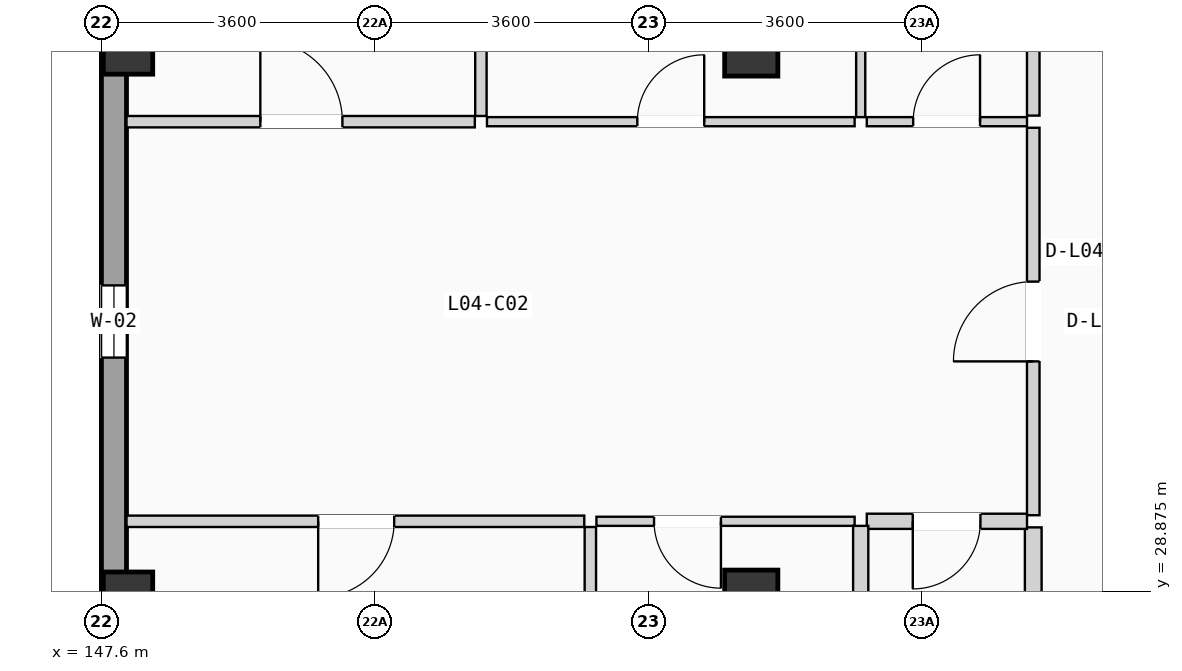
"""IFC4 building model, lengths in metres.
Left out: names, types, materials, properties, quantities, classifications, styles, units other than length and angle.
Written with IfcOpenShell. Run it as: python <this file> out.ifc"""

import sys

from ifc_helpers import new_model, si_unit, direction, frame, frame_2d, origin, origin_2d, place, context, subcontext, project, spatial, rectangle, extrude, element, fill, save


model = new_model("IFC4")
c1 = context("Model", 3, precision=1e-05, world=origin(), true_north=direction((0.0, 1.0)))
c2 = subcontext(c1, "Body", "Model", "MODEL_VIEW")
j1 = project(units=[si_unit("LENGTHUNIT", "METRE"), si_unit("PLANEANGLEUNIT", "RADIAN")], contexts=[c1])
p1 = place(None, origin())
s1 = spatial("IfcSite", under=j1, at=p1, CompositionType="ELEMENT")
p2 = place(p1, origin())
s2 = spatial("IfcBuilding", under=s1, at=p2, CompositionType="ELEMENT")
p3 = place(p2, frame((0.0, 0.0, 15.225)))
s3 = spatial("IfcBuildingStorey", under=s2, at=p3, CompositionType="ELEMENT", Elevation=15.225)
for number, where, z_axis, x_axis in (
    (1, (147.95, 28.8, 0.0), (0.0, 0.0, 1.0), (1.0, 0.0, 0.0)),
    (2, (147.95, 36.0, 0.0), (0.0, 0.0, 1.0), (1.0, 0.0, 0.0)),
):
    element("IfcColumn", number, at=place(p3, frame(where, z_axis=z_axis, x_axis=x_axis)), inside=s3, PredefinedType="COLUMN", context=c2, shape_type="SweptSolid", body=[
        extrude(rectangle(XDim=0.65, YDim=0.65, at=origin_2d()), origin(), (0.0, 0.0, 1.0), 3.15),
    ])
for number, where, z_axis, x_axis in (
    (3, (156.15, 28.8, 0.0), (0.0, 0.0, 1.0), (1.0, 0.0, 0.0)),
    (4, (156.15, 36.0, 0.0), (0.0, 0.0, 1.0), (1.0, 0.0, 0.0)),
):
    element("IfcColumn", number, at=place(p3, frame(where, z_axis=z_axis, x_axis=x_axis)), inside=s3, PredefinedType="COLUMN", context=c2, shape_type="SweptSolid", body=[
        extrude(rectangle(XDim=0.7, YDim=0.7, at=origin_2d()), origin(), (0.0, 0.0, 1.0), 3.15),
    ])
p4 = place(p3, frame((147.765, 0.33, 0.0), z_axis=(0.0, 0.0, 1.0), x_axis=(0.0, 1.0, 0.0)))
e5 = element("IfcWall", 5, at=p4, inside=s3, PredefinedType="SOLIDWALL", context=c2, shape_type="SweptSolid", body=[
    extrude(rectangle(XDim=49.74, YDim=0.33, at=frame_2d((24.87, 0.0))), origin(), (0.0, 0.0, 1.0), 2.89),
])
p5 = place(p4, frame((15.17, 0.0, 0.555)))
e6 = element("IfcOpeningElement", 6, at=p5, cuts=e5, PredefinedType="OPENING", context=c2, shape_type="SweptSolid", body=[
    extrude(rectangle(XDim=2.3, YDim=1.65, at=frame_2d((1.15, 0.825))), frame((0.0, 0.175, 0.0), z_axis=(0.0, -1.0, 0.0), x_axis=(1.0, 0.0, 0.0)), (0.0, 0.0, 1.0), 0.35),
])
p6 = place(p4, frame((9.251, 0.0, 0.85)))
e7 = element("IfcOpeningElement", 7, at=p6, cuts=e5, PredefinedType="OPENING", context=c2, shape_type="SweptSolid", body=[
    extrude(rectangle(XDim=0.95, YDim=1.2, at=frame_2d((0.475, 0.6))), frame((0.0, 0.175, 0.0), z_axis=(0.0, -1.0, 0.0), x_axis=(1.0, 0.0, 0.0)), (0.0, 0.0, 1.0), 0.35),
])
p7 = place(p4, frame((19.255, 0.0, 0.9)))
e8 = element("IfcOpeningElement", 8, at=p7, cuts=e5, PredefinedType="OPENING", context=c2, shape_type="SweptSolid", body=[
    extrude(rectangle(XDim=0.95, YDim=1.2, at=frame_2d((0.475, 0.6))), frame((0.0, 0.175, 0.0), z_axis=(0.0, -1.0, 0.0), x_axis=(1.0, 0.0, 0.0)), (0.0, 0.0, 1.0), 0.35),
])
p8 = place(p4, frame((31.616, 0.0, 0.855)))
e9 = element("IfcOpeningElement", 9, at=p8, cuts=e5, PredefinedType="OPENING", context=c2, shape_type="SweptSolid", body=[
    extrude(rectangle(XDim=0.95, YDim=1.35, at=frame_2d((0.475, 0.675))), frame((0.0, 0.175, 0.0), z_axis=(0.0, -1.0, 0.0), x_axis=(1.0, 0.0, 0.0)), (0.0, 0.0, 1.0), 0.35),
])
p9 = place(p4, frame((25.401, 0.0, 0.705)))
e10 = element("IfcOpeningElement", 10, at=p9, cuts=e5, PredefinedType="OPENING", context=c2, shape_type="SweptSolid", body=[
    extrude(rectangle(XDim=0.95, YDim=1.5, at=frame_2d((0.475, 0.75))), frame((0.0, 0.175, 0.0), z_axis=(0.0, -1.0, 0.0), x_axis=(1.0, 0.0, 0.0)), (0.0, 0.0, 1.0), 0.35),
])
p10 = place(p4, frame((38.73, 0.0, 0.555)))
e11 = element("IfcOpeningElement", 11, at=p10, cuts=e5, PredefinedType="OPENING", context=c2, shape_type="SweptSolid", body=[
    extrude(rectangle(XDim=0.95, YDim=1.65, at=frame_2d((0.475, 0.825))), frame((0.0, 0.175, 0.0), z_axis=(0.0, -1.0, 0.0), x_axis=(1.0, 0.0, 0.0)), (0.0, 0.0, 1.0), 0.35),
])
p11 = place(p3, frame((159.86, 29.872, 0.0), z_axis=(0.0, 0.0, 1.0), x_axis=(0.0, 1.0, 0.0)))
e12 = element("IfcWall", 12, at=p11, inside=s3, PredefinedType="PARTITIONING", context=c2, shape_type="SweptSolid", body=[
    extrude(rectangle(XDim=5.098, YDim=0.165, at=frame_2d((2.549, 0.0))), origin(), (0.0, 0.0, 1.0), 2.87),
])
p12 = place(p11, frame((2.024, 0.0, 0.0)))
e13 = element("IfcOpeningElement", 13, at=p12, cuts=e12, PredefinedType="OPENING", context=c2, shape_type="SweptSolid", body=[
    extrude(rectangle(XDim=1.05, YDim=2.13, at=frame_2d((0.525, 1.065))), frame((0.0, 0.093, 0.0), z_axis=(0.0, -1.0, 0.0), x_axis=(1.0, 0.0, 0.0)), (0.0, 0.0, 1.0), 0.185),
])
p13 = place(p3, frame((159.86, 23.882, 0.0), z_axis=(0.0, 0.0, 1.0), x_axis=(0.0, 1.0, 0.0)))
e14 = element("IfcWall", 14, at=p13, inside=s3, PredefinedType="PLUMBINGWALL", context=c2, shape_type="SweptSolid", body=[
    extrude(rectangle(XDim=5.83, YDim=0.22, at=frame_2d((2.915, 0.0))), origin(), (0.0, 0.0, 1.0), 2.87),
])
p14 = place(p3, frame((159.86, 35.13, 0.0), z_axis=(0.0, 0.0, 1.0), x_axis=(0.0, 1.0, 0.0)))
e15 = element("IfcWall", 15, at=p14, inside=s3, PredefinedType="PARTITIONING", context=c2, shape_type="SweptSolid", body=[
    extrude(rectangle(XDim=7.67, YDim=0.165, at=frame_2d((3.835, 0.0))), origin(), (0.0, 0.0, 1.0), 2.87),
])
p15 = place(p3, frame((157.67, 29.792, 0.0), z_axis=(0.0, 0.0, 1.0), x_axis=(1.0, 0.0, 0.0)))
e16 = element("IfcWall", 16, at=p15, inside=s3, PredefinedType="PLUMBINGWALL", context=c2, shape_type="SweptSolid", body=[
    extrude(rectangle(XDim=2.108, YDim=0.2, at=frame_2d((1.054, 0.0))), origin(), (0.0, 0.0, 1.0), 2.87),
])
p16 = place(p15, frame((0.605, 0.0, 0.0)))
e17 = element("IfcOpeningElement", 17, at=p16, cuts=e16, PredefinedType="OPENING", context=c2, shape_type="SweptSolid", body=[
    extrude(rectangle(XDim=0.89, YDim=2.03, at=frame_2d((0.445, 1.015))), frame((0.0, 0.11, 0.0), z_axis=(0.0, -1.0, 0.0), x_axis=(1.0, 0.0, 0.0)), (0.0, 0.0, 1.0), 0.22),
])
p17 = place(p3, frame((157.67, 35.05, 0.0), z_axis=(0.0, 0.0, 1.0), x_axis=(1.0, 0.0, 0.0)))
e18 = element("IfcWall", 18, at=p17, inside=s3, PredefinedType="PARTITIONING", context=c2, shape_type="SweptSolid", body=[
    extrude(rectangle(XDim=2.108, YDim=0.12, at=frame_2d((1.054, 0.0))), origin(), (0.0, 0.0, 1.0), 2.87),
])
p18 = place(p17, frame((0.61, 0.0, 0.0)))
e19 = element("IfcOpeningElement", 19, at=p18, cuts=e18, PredefinedType="OPENING", context=c2, shape_type="SweptSolid", body=[
    extrude(rectangle(XDim=0.88, YDim=2.02, at=frame_2d((0.44, 1.01))), frame((0.0, 0.07, 0.0), z_axis=(0.0, -1.0, 0.0), x_axis=(1.0, 0.0, 0.0)), (0.0, 0.0, 1.0), 0.14),
])
p19 = place(p3, frame((147.93, 29.792, 0.0), z_axis=(0.0, 0.0, 1.0), x_axis=(1.0, 0.0, 0.0)))
e20 = element("IfcWall", 20, at=p19, inside=s3, PredefinedType="PARTITIONING", context=c2, shape_type="SweptSolid", body=[
    extrude(rectangle(XDim=6.023, YDim=0.15, at=frame_2d((3.011, 0.0))), origin(), (0.0, 0.0, 1.0), 2.87),
])
p20 = place(p19, frame((2.522, 0.0, 0.0)))
e21 = element("IfcOpeningElement", 21, at=p20, cuts=e20, PredefinedType="OPENING", context=c2, shape_type="SweptSolid", body=[
    extrude(rectangle(XDim=1.0, YDim=2.06, at=frame_2d((0.5, 1.03))), frame((0.0, 0.085, 0.0), z_axis=(0.0, -1.0, 0.0), x_axis=(1.0, 0.0, 0.0)), (0.0, 0.0, 1.0), 0.17),
])
p21 = place(p3, frame((154.113, 29.792, 0.0), z_axis=(0.0, 0.0, 1.0), x_axis=(1.0, 0.0, 0.0)))
e22 = element("IfcWall", 22, at=p21, inside=s3, PredefinedType="PARTITIONING", context=c2, shape_type="SweptSolid", body=[
    extrude(rectangle(XDim=3.397, YDim=0.12, at=frame_2d((1.698, 0.0))), origin(), (0.0, 0.0, 1.0), 2.87),
])
p22 = place(p21, frame((0.758, 0.0, 0.0)))
e23 = element("IfcOpeningElement", 23, at=p22, cuts=e22, PredefinedType="OPENING", context=c2, shape_type="SweptSolid", body=[
    extrude(rectangle(XDim=0.88, YDim=2.02, at=frame_2d((0.44, 1.01))), frame((0.0, 0.07, 0.0), z_axis=(0.0, -1.0, 0.0), x_axis=(1.0, 0.0, 0.0)), (0.0, 0.0, 1.0), 0.14),
])
p23 = place(p3, frame((147.93, 35.05, 0.0), z_axis=(0.0, 0.0, 1.0), x_axis=(1.0, 0.0, 0.0)))
e24 = element("IfcWall", 24, at=p23, inside=s3, PredefinedType="PARTITIONING", context=c2, shape_type="SweptSolid", body=[
    extrude(rectangle(XDim=4.583, YDim=0.15, at=frame_2d((2.292, 0.0))), origin(), (0.0, 0.0, 1.0), 2.87),
])
p24 = place(p23, frame((1.761, 0.0, 0.0)))
e25 = element("IfcOpeningElement", 25, at=p24, cuts=e24, PredefinedType="OPENING", context=c2, shape_type="SweptSolid", body=[
    extrude(rectangle(XDim=1.08, YDim=2.1, at=frame_2d((0.54, 1.05))), frame((0.0, 0.085, 0.0), z_axis=(0.0, -1.0, 0.0), x_axis=(1.0, 0.0, 0.0)), (0.0, 0.0, 1.0), 0.17),
])
p25 = place(p3, frame((152.673, 35.05, 0.0), z_axis=(0.0, 0.0, 1.0), x_axis=(1.0, 0.0, 0.0)))
e26 = element("IfcWall", 26, at=p25, inside=s3, PredefinedType="PARTITIONING", context=c2, shape_type="SweptSolid", body=[
    extrude(rectangle(XDim=4.837, YDim=0.12, at=frame_2d((2.418, 0.0))), origin(), (0.0, 0.0, 1.0), 2.87),
])
p26 = place(p25, frame((1.978, 0.0, 0.0)))
e27 = element("IfcOpeningElement", 27, at=p26, cuts=e26, PredefinedType="OPENING", context=c2, shape_type="SweptSolid", body=[
    extrude(rectangle(XDim=0.88, YDim=2.02, at=frame_2d((0.44, 1.01))), frame((0.0, 0.07, 0.0), z_axis=(0.0, -1.0, 0.0), x_axis=(1.0, 0.0, 0.0)), (0.0, 0.0, 1.0), 0.14),
])
p27 = place(p3, frame((157.59, 23.882, 0.0), z_axis=(0.0, 0.0, 1.0), x_axis=(0.0, 1.0, 0.0)))
e28 = element("IfcWall", 28, at=p27, inside=s3, PredefinedType="PLUMBINGWALL", context=c2, shape_type="SweptSolid", body=[
    extrude(rectangle(XDim=5.85, YDim=0.2, at=frame_2d((2.925, 0.0))), origin(), (0.0, 0.0, 1.0), 2.87),
])
p28 = place(p27, frame((2.49, 0.0, 0.0)))
e29 = element("IfcOpeningElement", 29, at=p28, cuts=e28, PredefinedType="OPENING", context=c2, shape_type="SweptSolid", body=[
    extrude(rectangle(XDim=0.85, YDim=2.01, at=frame_2d((0.425, 1.005))), frame((0.0, 0.11, 0.0), z_axis=(0.0, -1.0, 0.0), x_axis=(1.0, 0.0, 0.0)), (0.0, 0.0, 1.0), 0.22),
])
p29 = place(p3, frame((157.59, 35.11, 0.0), z_axis=(0.0, 0.0, 1.0), x_axis=(0.0, 1.0, 0.0)))
e30 = element("IfcWall", 30, at=p29, inside=s3, PredefinedType="PARTITIONING", context=c2, shape_type="SweptSolid", body=[
    extrude(rectangle(XDim=7.69, YDim=0.12, at=frame_2d((3.845, 0.0))), origin(), (0.0, 0.0, 1.0), 2.87),
])
p30 = place(p3, frame((154.033, 23.882, 0.0), z_axis=(0.0, 0.0, 1.0), x_axis=(0.0, 1.0, 0.0)))
e31 = element("IfcWall", 31, at=p30, inside=s3, PredefinedType="PARTITIONING", context=c2, shape_type="SweptSolid", body=[
    extrude(rectangle(XDim=5.835, YDim=0.15, at=frame_2d((2.917, 0.0))), origin(), (0.0, 0.0, 1.0), 2.87),
])
p31 = place(p3, frame((152.593, 35.125, 0.0), z_axis=(0.0, 0.0, 1.0), x_axis=(0.0, 1.0, 0.0)))
e32 = element("IfcWall", 32, at=p31, inside=s3, PredefinedType="PARTITIONING", context=c2, shape_type="SweptSolid", body=[
    extrude(rectangle(XDim=7.675, YDim=0.15, at=frame_2d((3.837, 0.0))), origin(), (0.0, 0.0, 1.0), 2.87),
])
p32 = place(p8, origin())
e33 = element("IfcWindow", 33, at=p32, inside=s3, PartitioningType="SINGLE_PANEL", PredefinedType="WINDOW", context=c2, shape_type="SweptSolid", body=[
    extrude(rectangle(XDim=0.95, YDim=1.35, at=frame_2d((0.475, 0.675))), frame((0.0, 0.03, 0.0), z_axis=(0.0, -1.0, 0.0), x_axis=(1.0, 0.0, 0.0)), (0.0, 0.0, 1.0), 0.06),
])
fill(e9, e33)
p33 = place(p12, origin())
e34 = element("IfcDoor", 34, at=p33, inside=s3, OperationType="SINGLE_SWING_LEFT", PredefinedType="DOOR", context=c2, shape_type="SweptSolid", body=[
    extrude(rectangle(XDim=1.05, YDim=2.13, at=frame_2d((0.525, 1.065))), frame((0.0, 0.025, 0.0), z_axis=(0.0, -1.0, 0.0), x_axis=(1.0, 0.0, 0.0)), (0.0, 0.0, 1.0), 0.05),
])
fill(e13, e34)
p34 = place(p16, frame((0.89, 0.0, 0.0), z_axis=(0.0, 0.0, 1.0), x_axis=(-1.0, 0.0, 0.0)))
e35 = element("IfcDoor", 35, at=p34, inside=s3, OperationType="SINGLE_SWING_LEFT", PredefinedType="DOOR", context=c2, shape_type="SweptSolid", body=[
    extrude(rectangle(XDim=0.89, YDim=2.03, at=frame_2d((0.445, 1.015))), frame((0.0, 0.025, 0.0), z_axis=(0.0, -1.0, 0.0), x_axis=(1.0, 0.0, 0.0)), (0.0, 0.0, 1.0), 0.05),
])
fill(e17, e35)
p35 = place(p18, origin())
e36 = element("IfcDoor", 36, at=p35, inside=s3, OperationType="SINGLE_SWING_RIGHT", PredefinedType="DOOR", context=c2, shape_type="SweptSolid", body=[
    extrude(rectangle(XDim=0.88, YDim=2.02, at=frame_2d((0.44, 1.01))), frame((0.0, 0.025, 0.0), z_axis=(0.0, -1.0, 0.0), x_axis=(1.0, 0.0, 0.0)), (0.0, 0.0, 1.0), 0.05),
])
fill(e19, e36)
p36 = place(p20, frame((1.0, 0.0, 0.0), z_axis=(0.0, 0.0, 1.0), x_axis=(-1.0, 0.0, 0.0)))
e37 = element("IfcDoor", 37, at=p36, inside=s3, OperationType="SINGLE_SWING_LEFT", PredefinedType="DOOR", context=c2, shape_type="SweptSolid", body=[
    extrude(rectangle(XDim=1.0, YDim=2.06, at=frame_2d((0.5, 1.03))), frame((0.0, 0.025, 0.0), z_axis=(0.0, -1.0, 0.0), x_axis=(1.0, 0.0, 0.0)), (0.0, 0.0, 1.0), 0.05),
])
fill(e21, e37)
p37 = place(p22, frame((0.88, 0.0, 0.0), z_axis=(0.0, 0.0, 1.0), x_axis=(-1.0, 0.0, 0.0)))
e38 = element("IfcDoor", 38, at=p37, inside=s3, OperationType="SINGLE_SWING_RIGHT", PredefinedType="DOOR", context=c2, shape_type="SweptSolid", body=[
    extrude(rectangle(XDim=0.88, YDim=2.02, at=frame_2d((0.44, 1.01))), frame((0.0, 0.025, 0.0), z_axis=(0.0, -1.0, 0.0), x_axis=(1.0, 0.0, 0.0)), (0.0, 0.0, 1.0), 0.05),
])
fill(e23, e38)
p38 = place(p24, origin())
e39 = element("IfcDoor", 39, at=p38, inside=s3, OperationType="SINGLE_SWING_LEFT", PredefinedType="DOOR", context=c2, shape_type="SweptSolid", body=[
    extrude(rectangle(XDim=1.08, YDim=2.1, at=frame_2d((0.54, 1.05))), frame((0.0, 0.025, 0.0), z_axis=(0.0, -1.0, 0.0), x_axis=(1.0, 0.0, 0.0)), (0.0, 0.0, 1.0), 0.05),
])
fill(e25, e39)
p39 = place(p26, origin())
e40 = element("IfcDoor", 40, at=p39, inside=s3, OperationType="SINGLE_SWING_RIGHT", PredefinedType="DOOR", context=c2, shape_type="SweptSolid", body=[
    extrude(rectangle(XDim=0.88, YDim=2.02, at=frame_2d((0.44, 1.01))), frame((0.0, 0.025, 0.0), z_axis=(0.0, -1.0, 0.0), x_axis=(1.0, 0.0, 0.0)), (0.0, 0.0, 1.0), 0.05),
])
fill(e27, e40)
save(model, sys.argv[1])
